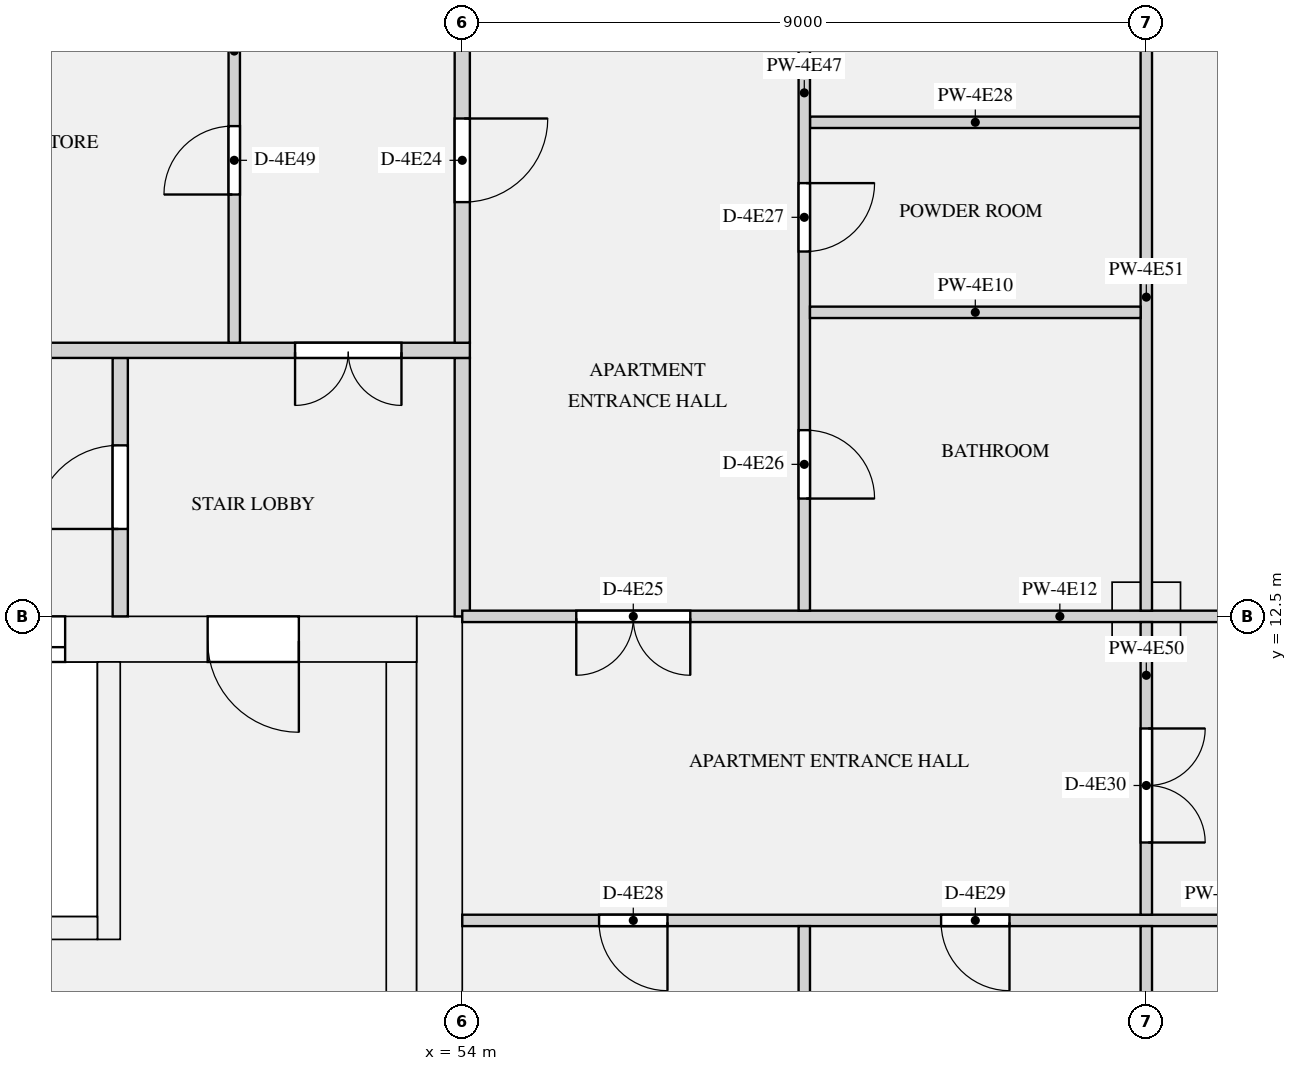
"""IFC4 building model, lengths in metres.
Left out: names, types, materials, properties, quantities, classifications, styles, units other than length and angle.
Written with IfcOpenShell. Run it as: python <this file> out.ifc"""

import sys

from ifc_helpers import new_model, si_unit, direction, frame, frame_2d, origin, origin_2d, place, context, subcontext, project, spatial, rectangle, extrude, element, fill, save


model = new_model("IFC4")
c1 = context("Model", 3, precision=1e-05, world=origin(), true_north=direction((0.0, 1.0)))
c2 = subcontext(c1, "Body", "Model", "MODEL_VIEW")
j1 = project(units=[si_unit("LENGTHUNIT", "METRE"), si_unit("PLANEANGLEUNIT", "RADIAN")], contexts=[c1])
p1 = place(None, origin())
s1 = spatial("IfcSite", under=j1, at=p1, CompositionType="ELEMENT")
p2 = place(p1, origin())
s2 = spatial("IfcBuilding", under=s1, at=p2, CompositionType="ELEMENT")
p3 = place(p2, frame((0.0, 0.0, 232.65)))
s3 = spatial("IfcBuildingStorey", under=s2, at=p3, CompositionType="ELEMENT", Elevation=232.65)
p4 = place(p3, frame((63.0, 12.5, 0.0), z_axis=(0.0, 0.0, 1.0), x_axis=(1.0, 0.0, 0.0)))
e1 = element("IfcColumn", 1, at=p4, inside=s3, PredefinedType="COLUMN", context=c2, shape_type="SweptSolid", body=[
    extrude(rectangle(XDim=0.9, YDim=0.9, at=origin_2d()), origin(), (0.0, 0.0, 1.0), 3.15),
])
p5 = place(p3, frame((53.7, 0.0, 0.0), z_axis=(0.0, 0.0, 1.0), x_axis=(0.0, 1.0, 0.0)))
e2 = element("IfcWall", 2, at=p5, inside=s3, PredefinedType="SHEAR", context=c2, shape_type="SweptSolid", body=[
    extrude(rectangle(XDim=12.5, YDim=0.6, at=frame_2d((6.25, 0.0))), origin(), (0.0, 0.0, 1.0), 3.15),
])
p6 = place(p3, frame((18.6, 12.2, 0.0), z_axis=(0.0, 0.0, 1.0), x_axis=(1.0, 0.0, 0.0)))
e3 = element("IfcWall", 3, at=p6, inside=s3, PredefinedType="SHEAR", context=c2, shape_type="SweptSolid", body=[
    extrude(rectangle(XDim=34.8, YDim=0.6, at=frame_2d((17.4, 0.0))), origin(), (0.0, 0.0, 1.0), 3.15),
])
p7 = place(p6, frame((24.575, 0.0, 0.0)))
e4 = element("IfcOpeningElement", 4, at=p7, cuts=e3, PredefinedType="OPENING", context=c2, shape_type="SweptSolid", body=[
    extrude(rectangle(XDim=1.1, YDim=2.1, at=frame_2d((0.55, 1.05))), frame((0.0, 0.31, 0.0), z_axis=(0.0, -1.0, 0.0), x_axis=(1.0, 0.0, 0.0)), (0.0, 0.0, 1.0), 0.62),
])
p8 = place(p6, frame((26.825, 0.0, 0.0)))
e5 = element("IfcOpeningElement", 5, at=p8, cuts=e3, PredefinedType="OPENING", context=c2, shape_type="SweptSolid", body=[
    extrude(rectangle(XDim=1.1, YDim=2.1, at=frame_2d((0.55, 1.05))), frame((0.0, 0.31, 0.0), z_axis=(0.0, -1.0, 0.0), x_axis=(1.0, 0.0, 0.0)), (0.0, 0.0, 1.0), 0.62),
])
p9 = place(p6, frame((29.075, 0.0, 0.0)))
e6 = element("IfcOpeningElement", 6, at=p9, cuts=e3, PredefinedType="OPENING", context=c2, shape_type="SweptSolid", body=[
    extrude(rectangle(XDim=1.1, YDim=2.1, at=frame_2d((0.55, 1.05))), frame((0.0, 0.31, 0.0), z_axis=(0.0, -1.0, 0.0), x_axis=(1.0, 0.0, 0.0)), (0.0, 0.0, 1.0), 0.62),
])
p10 = place(p6, frame((4.95, 0.0, 0.0)))
e7 = element("IfcOpeningElement", 7, at=p10, cuts=e3, PredefinedType="OPENING", context=c2, shape_type="SweptSolid", body=[
    extrude(rectangle(XDim=0.9, YDim=2.1, at=frame_2d((0.45, 1.05))), frame((0.0, 0.31, 0.0), z_axis=(0.0, -1.0, 0.0), x_axis=(1.0, 0.0, 0.0)), (0.0, 0.0, 1.0), 0.62),
])
p11 = place(p6, frame((11.95, 0.0, 0.0)))
e8 = element("IfcOpeningElement", 8, at=p11, cuts=e3, PredefinedType="OPENING", context=c2, shape_type="SweptSolid", body=[
    extrude(rectangle(XDim=0.9, YDim=2.1, at=frame_2d((0.45, 1.05))), frame((0.0, 0.31, 0.0), z_axis=(0.0, -1.0, 0.0), x_axis=(1.0, 0.0, 0.0)), (0.0, 0.0, 1.0), 0.62),
])
p12 = place(p6, frame((18.45, 0.0, 0.0)))
e9 = element("IfcOpeningElement", 9, at=p12, cuts=e3, PredefinedType="OPENING", context=c2, shape_type="SweptSolid", body=[
    extrude(rectangle(XDim=0.9, YDim=2.1, at=frame_2d((0.45, 1.05))), frame((0.0, 0.31, 0.0), z_axis=(0.0, -1.0, 0.0), x_axis=(1.0, 0.0, 0.0)), (0.0, 0.0, 1.0), 0.62),
])
p13 = place(p6, frame((1.55, 0.0, 0.0)))
e10 = element("IfcOpeningElement", 10, at=p13, cuts=e3, PredefinedType="OPENING", context=c2, shape_type="SweptSolid", body=[
    extrude(rectangle(XDim=1.2, YDim=2.1, at=frame_2d((0.6, 1.05))), frame((0.0, 0.31, 0.0), z_axis=(0.0, -1.0, 0.0), x_axis=(1.0, 0.0, 0.0)), (0.0, 0.0, 1.0), 0.62),
])
p14 = place(p6, frame((32.05, 0.0, 0.0)))
e11 = element("IfcOpeningElement", 11, at=p14, cuts=e3, PredefinedType="OPENING", context=c2, shape_type="SweptSolid", body=[
    extrude(rectangle(XDim=1.2, YDim=2.1, at=frame_2d((0.6, 1.05))), frame((0.0, 0.31, 0.0), z_axis=(0.0, -1.0, 0.0), x_axis=(1.0, 0.0, 0.0)), (0.0, 0.0, 1.0), 0.62),
])
p15 = place(p3, frame((53.2, 1.0, 0.0), z_axis=(0.0, 0.0, 1.0), x_axis=(0.0, 1.0, 0.0)))
e12 = element("IfcWall", 12, at=p15, inside=s3, PredefinedType="SHEAR", context=c2, shape_type="SweptSolid", body=[
    extrude(rectangle(XDim=10.9, YDim=0.4, at=frame_2d((5.45, 0.0))), origin(), (0.0, 0.0, 1.0), 3.15),
])
p16 = place(p3, frame((47.25, 8.4, 0.0), z_axis=(0.0, 0.0, 1.0), x_axis=(1.0, 0.0, 0.0)))
e13 = element("IfcWall", 13, at=p16, inside=s3, PredefinedType="SHEAR", context=c2, shape_type="SweptSolid", body=[
    extrude(rectangle(XDim=1.95, YDim=0.3, at=frame_2d((0.975, 0.0))), origin(), (0.0, 0.0, 1.0), 3.15),
])
p17 = place(p3, frame((49.35, 8.25, 0.0), z_axis=(0.0, 0.0, 1.0), x_axis=(0.0, 1.0, 0.0)))
e14 = element("IfcWall", 14, at=p17, inside=s3, PredefinedType="SHEAR", context=c2, shape_type="SweptSolid", body=[
    extrude(rectangle(XDim=3.65, YDim=0.3, at=frame_2d((1.825, 0.0))), origin(), (0.0, 0.0, 1.0), 3.15),
])
p18 = place(p3, frame((49.5, 12.5, 0.0), z_axis=(0.0, 0.0, 1.0), x_axis=(0.0, 1.0, 0.0)))
e15 = element("IfcWall", 15, at=p18, inside=s3, PredefinedType="PARTITIONING", context=c2, shape_type="SweptSolid", body=[
    extrude(rectangle(XDim=3.4, YDim=0.2, at=frame_2d((1.7, 0.0))), origin(), (0.0, 0.0, 1.0), 2.8),
])
p19 = place(p18, frame((1.15, 0.0, 0.0)))
e16 = element("IfcOpeningElement", 16, at=p19, cuts=e15, PredefinedType="OPENING", context=c2, shape_type="SweptSolid", body=[
    extrude(rectangle(XDim=1.1, YDim=2.1, at=frame_2d((0.55, 1.05))), frame((0.0, 0.11, 0.0), z_axis=(0.0, -1.0, 0.0), x_axis=(1.0, 0.0, 0.0)), (0.0, 0.0, 1.0), 0.22),
])
p20 = place(p3, frame((54.0, 12.5, 0.0), z_axis=(0.0, 0.0, 1.0), x_axis=(0.0, 1.0, 0.0)))
e17 = element("IfcWall", 17, at=p20, inside=s3, PredefinedType="PARTITIONING", context=c2, shape_type="SweptSolid", body=[
    extrude(rectangle(XDim=3.4, YDim=0.2, at=frame_2d((1.7, 0.0))), origin(), (0.0, 0.0, 1.0), 2.8),
])
p21 = place(p3, frame((58.575, 16.5, 0.0), z_axis=(0.0, 0.0, 1.0), x_axis=(1.0, 0.0, 0.0)))
e18 = element("IfcWall", 18, at=p21, inside=s3, PredefinedType="PARTITIONING", context=c2, shape_type="SweptSolid", body=[
    extrude(rectangle(XDim=4.35, YDim=0.15, at=frame_2d((2.175, 0.0))), origin(), (0.0, 0.0, 1.0), 2.8),
])
p22 = place(p3, frame((54.0, 12.5, 0.0), z_axis=(0.0, 0.0, 1.0), x_axis=(1.0, 0.0, 0.0)))
e19 = element("IfcWall", 19, at=p22, inside=s3, PredefinedType="PARTITIONING", context=c2, shape_type="SweptSolid", body=[
    extrude(rectangle(XDim=17.35, YDim=0.15, at=frame_2d((8.675, 0.0))), origin(), (0.0, 0.0, 1.0), 2.8),
])
p23 = place(p22, frame((1.5, 0.0, 0.0)))
e20 = element("IfcOpeningElement", 20, at=p23, cuts=e19, PredefinedType="OPENING", context=c2, shape_type="SweptSolid", body=[
    extrude(rectangle(XDim=1.5, YDim=2.1, at=frame_2d((0.75, 1.05))), frame((0.0, 0.085, 0.0), z_axis=(0.0, -1.0, 0.0), x_axis=(1.0, 0.0, 0.0)), (0.0, 0.0, 1.0), 0.17),
])
p24 = place(p22, frame((12.725, 0.0, 0.0)))
e21 = element("IfcOpeningElement", 21, at=p24, cuts=e19, PredefinedType="OPENING", context=c2, shape_type="SweptSolid", body=[
    extrude(rectangle(XDim=1.5, YDim=2.1, at=frame_2d((0.75, 1.05))), frame((0.0, 0.085, 0.0), z_axis=(0.0, -1.0, 0.0), x_axis=(1.0, 0.0, 0.0)), (0.0, 0.0, 1.0), 0.17),
])
p25 = place(p3, frame((54.0, 8.5, 0.0), z_axis=(0.0, 0.0, 1.0), x_axis=(1.0, 0.0, 0.0)))
e22 = element("IfcWall", 22, at=p25, inside=s3, PredefinedType="PARTITIONING", context=c2, shape_type="SweptSolid", body=[
    extrude(rectangle(XDim=17.35, YDim=0.15, at=frame_2d((8.675, 0.0))), origin(), (0.0, 0.0, 1.0), 2.8),
])
p26 = place(p25, frame((1.8, 0.0, 0.0)))
e23 = element("IfcOpeningElement", 23, at=p26, cuts=e22, PredefinedType="OPENING", context=c2, shape_type="SweptSolid", body=[
    extrude(rectangle(XDim=0.9, YDim=2.1, at=frame_2d((0.45, 1.05))), frame((0.0, 0.085, 0.0), z_axis=(0.0, -1.0, 0.0), x_axis=(1.0, 0.0, 0.0)), (0.0, 0.0, 1.0), 0.17),
])
p27 = place(p25, frame((6.3, 0.0, 0.0)))
e24 = element("IfcOpeningElement", 24, at=p27, cuts=e22, PredefinedType="OPENING", context=c2, shape_type="SweptSolid", body=[
    extrude(rectangle(XDim=0.9, YDim=2.1, at=frame_2d((0.45, 1.05))), frame((0.0, 0.085, 0.0), z_axis=(0.0, -1.0, 0.0), x_axis=(1.0, 0.0, 0.0)), (0.0, 0.0, 1.0), 0.17),
])
p28 = place(p25, frame((12.8, 0.0, 0.0)))
e25 = element("IfcOpeningElement", 25, at=p28, cuts=e22, PredefinedType="OPENING", context=c2, shape_type="SweptSolid", body=[
    extrude(rectangle(XDim=0.9, YDim=2.1, at=frame_2d((0.45, 1.05))), frame((0.0, 0.085, 0.0), z_axis=(0.0, -1.0, 0.0), x_axis=(1.0, 0.0, 0.0)), (0.0, 0.0, 1.0), 0.17),
])
p29 = place(p3, frame((58.575, 19.0, 0.0), z_axis=(0.0, 0.0, 1.0), x_axis=(1.0, 0.0, 0.0)))
e26 = element("IfcWall", 26, at=p29, inside=s3, PredefinedType="PARTITIONING", context=c2, shape_type="SweptSolid", body=[
    extrude(rectangle(XDim=4.35, YDim=0.15, at=frame_2d((2.175, 0.0))), origin(), (0.0, 0.0, 1.0), 2.8),
])
p30 = place(p3, frame((17.9, 16.0, 0.0), z_axis=(0.0, 0.0, 1.0), x_axis=(1.0, 0.0, 0.0)))
e27 = element("IfcWall", 27, at=p30, inside=s3, PredefinedType="PARTITIONING", context=c2, shape_type="SweptSolid", body=[
    extrude(rectangle(XDim=36.2, YDim=0.2, at=frame_2d((18.1, 0.0))), origin(), (0.0, 0.0, 1.0), 2.8),
])
p31 = place(p30, frame((0.9, 0.0, 0.0)))
e28 = element("IfcOpeningElement", 28, at=p31, cuts=e27, PredefinedType="OPENING", context=c2, shape_type="SweptSolid", body=[
    extrude(rectangle(XDim=1.4, YDim=2.1, at=frame_2d((0.7, 1.05))), frame((0.0, 0.11, 0.0), z_axis=(0.0, -1.0, 0.0), x_axis=(1.0, 0.0, 0.0)), (0.0, 0.0, 1.0), 0.22),
])
p32 = place(p30, frame((33.9, 0.0, 0.0)))
e29 = element("IfcOpeningElement", 29, at=p32, cuts=e27, PredefinedType="OPENING", context=c2, shape_type="SweptSolid", body=[
    extrude(rectangle(XDim=1.4, YDim=2.1, at=frame_2d((0.7, 1.05))), frame((0.0, 0.11, 0.0), z_axis=(0.0, -1.0, 0.0), x_axis=(1.0, 0.0, 0.0)), (0.0, 0.0, 1.0), 0.22),
])
p33 = place(p3, frame((54.0, 16.1, 0.0), z_axis=(0.0, 0.0, 1.0), x_axis=(0.0, 1.0, 0.0)))
e30 = element("IfcWall", 30, at=p33, inside=s3, PredefinedType="PARTITIONING", context=c2, shape_type="SweptSolid", body=[
    extrude(rectangle(XDim=7.8, YDim=0.2, at=frame_2d((3.9, 0.0))), origin(), (0.0, 0.0, 1.0), 2.8),
])
p34 = place(p33, frame((1.85, 0.0, 0.0)))
e31 = element("IfcOpeningElement", 31, at=p34, cuts=e30, PredefinedType="OPENING", context=c2, shape_type="SweptSolid", body=[
    extrude(rectangle(XDim=1.1, YDim=2.1, at=frame_2d((0.55, 1.05))), frame((0.0, 0.11, 0.0), z_axis=(0.0, -1.0, 0.0), x_axis=(1.0, 0.0, 0.0)), (0.0, 0.0, 1.0), 0.22),
])
p35 = place(p3, frame((51.0, 16.1, 0.0), z_axis=(0.0, 0.0, 1.0), x_axis=(0.0, 1.0, 0.0)))
e32 = element("IfcWall", 32, at=p35, inside=s3, PredefinedType="PARTITIONING", context=c2, shape_type="SweptSolid", body=[
    extrude(rectangle(XDim=4.825, YDim=0.15, at=frame_2d((2.413, 0.0))), origin(), (0.0, 0.0, 1.0), 2.8),
])
p36 = place(p35, frame((1.95, 0.0, 0.0)))
e33 = element("IfcOpeningElement", 33, at=p36, cuts=e32, PredefinedType="OPENING", context=c2, shape_type="SweptSolid", body=[
    extrude(rectangle(XDim=0.9, YDim=2.1, at=frame_2d((0.45, 1.05))), frame((0.0, 0.085, 0.0), z_axis=(0.0, -1.0, 0.0), x_axis=(1.0, 0.0, 0.0)), (0.0, 0.0, 1.0), 0.17),
])
p37 = place(p3, frame((58.5, 0.65, 0.0), z_axis=(0.0, 0.0, 1.0), x_axis=(0.0, 1.0, 0.0)))
e34 = element("IfcWall", 34, at=p37, inside=s3, PredefinedType="PARTITIONING", context=c2, shape_type="SweptSolid", body=[
    extrude(rectangle(XDim=7.775, YDim=0.15, at=frame_2d((3.888, 0.0))), origin(), (0.0, 0.0, 1.0), 2.8),
])
p38 = place(p3, frame((58.5, 12.575, 0.0), z_axis=(0.0, 0.0, 1.0), x_axis=(0.0, 1.0, 0.0)))
e35 = element("IfcWall", 35, at=p38, inside=s3, PredefinedType="PARTITIONING", context=c2, shape_type="SweptSolid", body=[
    extrude(rectangle(XDim=10.325, YDim=0.15, at=frame_2d((5.163, 0.0))), origin(), (0.0, 0.0, 1.0), 2.8),
])
p39 = place(p38, frame((1.475, 0.0, 0.0)))
e36 = element("IfcOpeningElement", 36, at=p39, cuts=e35, PredefinedType="OPENING", context=c2, shape_type="SweptSolid", body=[
    extrude(rectangle(XDim=0.9, YDim=2.1, at=frame_2d((0.45, 1.05))), frame((0.0, 0.085, 0.0), z_axis=(0.0, -1.0, 0.0), x_axis=(1.0, 0.0, 0.0)), (0.0, 0.0, 1.0), 0.17),
])
p40 = place(p38, frame((4.725, 0.0, 0.0)))
e37 = element("IfcOpeningElement", 37, at=p40, cuts=e35, PredefinedType="OPENING", context=c2, shape_type="SweptSolid", body=[
    extrude(rectangle(XDim=0.9, YDim=2.1, at=frame_2d((0.45, 1.05))), frame((0.0, 0.085, 0.0), z_axis=(0.0, -1.0, 0.0), x_axis=(1.0, 0.0, 0.0)), (0.0, 0.0, 1.0), 0.17),
])
p41 = place(p38, frame((8.0, 0.0, 0.0)))
e38 = element("IfcOpeningElement", 38, at=p41, cuts=e35, PredefinedType="OPENING", context=c2, shape_type="SweptSolid", body=[
    extrude(rectangle(XDim=0.9, YDim=2.1, at=frame_2d((0.45, 1.05))), frame((0.0, 0.085, 0.0), z_axis=(0.0, -1.0, 0.0), x_axis=(1.0, 0.0, 0.0)), (0.0, 0.0, 1.0), 0.17),
])
p42 = place(p3, frame((63.0, 0.65, 0.0), z_axis=(0.0, 0.0, 1.0), x_axis=(0.0, 1.0, 0.0)))
e39 = element("IfcWall", 39, at=p42, inside=s3, PredefinedType="PARTITIONING", context=c2, shape_type="SweptSolid", body=[
    extrude(rectangle(XDim=7.775, YDim=0.15, at=frame_2d((3.888, 0.0))), origin(), (0.0, 0.0, 1.0), 2.8),
])
p43 = place(p3, frame((63.0, 8.575, 0.0), z_axis=(0.0, 0.0, 1.0), x_axis=(0.0, 1.0, 0.0)))
e40 = element("IfcWall", 40, at=p43, inside=s3, PredefinedType="PARTITIONING", context=c2, shape_type="SweptSolid", body=[
    extrude(rectangle(XDim=3.85, YDim=0.15, at=frame_2d((1.925, 0.0))), origin(), (0.0, 0.0, 1.0), 2.8),
])
p44 = place(p43, frame((0.95, 0.0, 0.0)))
e41 = element("IfcOpeningElement", 41, at=p44, cuts=e40, PredefinedType="OPENING", context=c2, shape_type="SweptSolid", body=[
    extrude(rectangle(XDim=1.5, YDim=2.1, at=frame_2d((0.75, 1.05))), frame((0.0, 0.085, 0.0), z_axis=(0.0, -1.0, 0.0), x_axis=(1.0, 0.0, 0.0)), (0.0, 0.0, 1.0), 0.17),
])
p45 = place(p3, frame((63.0, 12.575, 0.0), z_axis=(0.0, 0.0, 1.0), x_axis=(0.0, 1.0, 0.0)))
e42 = element("IfcWall", 42, at=p45, inside=s3, PredefinedType="PARTITIONING", context=c2, shape_type="SweptSolid", body=[
    extrude(rectangle(XDim=11.85, YDim=0.15, at=frame_2d((5.925, 0.0))), origin(), (0.0, 0.0, 1.0), 2.8),
])
p46 = place(p45, frame((8.25, 0.0, 0.0)))
e43 = element("IfcOpeningElement", 43, at=p46, cuts=e42, PredefinedType="OPENING", context=c2, shape_type="SweptSolid", body=[
    extrude(rectangle(XDim=0.9, YDim=2.1, at=frame_2d((0.45, 1.05))), frame((0.0, 0.085, 0.0), z_axis=(0.0, -1.0, 0.0), x_axis=(1.0, 0.0, 0.0)), (0.0, 0.0, 1.0), 0.17),
])
p47 = place(p9, origin())
e44 = element("IfcDoor", 44, at=p47, inside=s3, OperationType="DOUBLE_DOOR_SLIDING", PredefinedType="DOOR", context=c2, shape_type="SweptSolid", body=[
    extrude(rectangle(XDim=1.1, YDim=2.1, at=frame_2d((0.55, 1.05))), frame((0.0, 0.025, 0.0), z_axis=(0.0, -1.0, 0.0), x_axis=(1.0, 0.0, 0.0)), (0.0, 0.0, 1.0), 0.05),
])
fill(e6, e44)
p48 = place(p14, frame((1.2, 0.0, 0.0), z_axis=(0.0, 0.0, 1.0), x_axis=(-1.0, 0.0, 0.0)))
e45 = element("IfcDoor", 45, at=p48, inside=s3, OperationType="SINGLE_SWING_LEFT", PredefinedType="DOOR", context=c2, shape_type="SweptSolid", body=[
    extrude(rectangle(XDim=1.2, YDim=2.1, at=frame_2d((0.6, 1.05))), frame((0.0, 0.025, 0.0), z_axis=(0.0, -1.0, 0.0), x_axis=(1.0, 0.0, 0.0)), (0.0, 0.0, 1.0), 0.05),
])
fill(e11, e45)
p49 = place(p19, origin())
e46 = element("IfcDoor", 46, at=p49, inside=s3, OperationType="SINGLE_SWING_LEFT", PredefinedType="DOOR", context=c2, shape_type="SweptSolid", body=[
    extrude(rectangle(XDim=1.1, YDim=2.1, at=frame_2d((0.55, 1.05))), frame((0.0, 0.025, 0.0), z_axis=(0.0, -1.0, 0.0), x_axis=(1.0, 0.0, 0.0)), (0.0, 0.0, 1.0), 0.05),
])
fill(e16, e46)
p50 = place(p32, frame((1.4, 0.0, 0.0), z_axis=(0.0, 0.0, 1.0), x_axis=(-1.0, 0.0, 0.0)))
e47 = element("IfcDoor", 47, at=p50, inside=s3, OperationType="DOUBLE_DOOR_SINGLE_SWING", PredefinedType="DOOR", context=c2, shape_type="SweptSolid", body=[
    extrude(rectangle(XDim=1.4, YDim=2.1, at=frame_2d((0.7, 1.05))), frame((0.0, 0.025, 0.0), z_axis=(0.0, -1.0, 0.0), x_axis=(1.0, 0.0, 0.0)), (0.0, 0.0, 1.0), 0.05),
])
fill(e29, e47)
p51 = place(p34, frame((1.1, 0.0, 0.0), z_axis=(0.0, 0.0, 1.0), x_axis=(-1.0, 0.0, 0.0)))
e48 = element("IfcDoor", 48, at=p51, inside=s3, OperationType="SINGLE_SWING_LEFT", PredefinedType="DOOR", context=c2, shape_type="SweptSolid", body=[
    extrude(rectangle(XDim=1.1, YDim=2.1, at=frame_2d((0.55, 1.05))), frame((0.0, 0.025, 0.0), z_axis=(0.0, -1.0, 0.0), x_axis=(1.0, 0.0, 0.0)), (0.0, 0.0, 1.0), 0.05),
])
fill(e31, e48)
p52 = place(p23, frame((1.5, 0.0, 0.0), z_axis=(0.0, 0.0, 1.0), x_axis=(-1.0, 0.0, 0.0)))
e49 = element("IfcDoor", 49, at=p52, inside=s3, OperationType="DOUBLE_DOOR_SINGLE_SWING", PredefinedType="DOOR", context=c2, shape_type="SweptSolid", body=[
    extrude(rectangle(XDim=1.5, YDim=2.1, at=frame_2d((0.75, 1.05))), frame((0.0, 0.025, 0.0), z_axis=(0.0, -1.0, 0.0), x_axis=(1.0, 0.0, 0.0)), (0.0, 0.0, 1.0), 0.05),
])
fill(e20, e49)
p53 = place(p39, frame((0.9, 0.0, 0.0), z_axis=(0.0, 0.0, 1.0), x_axis=(-1.0, 0.0, 0.0)))
e50 = element("IfcDoor", 50, at=p53, inside=s3, OperationType="SINGLE_SWING_RIGHT", PredefinedType="DOOR", context=c2, shape_type="SweptSolid", body=[
    extrude(rectangle(XDim=0.9, YDim=2.1, at=frame_2d((0.45, 1.05))), frame((0.0, 0.025, 0.0), z_axis=(0.0, -1.0, 0.0), x_axis=(1.0, 0.0, 0.0)), (0.0, 0.0, 1.0), 0.05),
])
fill(e36, e50)
p54 = place(p40, frame((0.9, 0.0, 0.0), z_axis=(0.0, 0.0, 1.0), x_axis=(-1.0, 0.0, 0.0)))
e51 = element("IfcDoor", 51, at=p54, inside=s3, OperationType="SINGLE_SWING_LEFT", PredefinedType="DOOR", context=c2, shape_type="SweptSolid", body=[
    extrude(rectangle(XDim=0.9, YDim=2.1, at=frame_2d((0.45, 1.05))), frame((0.0, 0.025, 0.0), z_axis=(0.0, -1.0, 0.0), x_axis=(1.0, 0.0, 0.0)), (0.0, 0.0, 1.0), 0.05),
])
fill(e37, e51)
p55 = place(p26, frame((0.9, 0.0, 0.0), z_axis=(0.0, 0.0, 1.0), x_axis=(-1.0, 0.0, 0.0)))
e52 = element("IfcDoor", 52, at=p55, inside=s3, OperationType="SINGLE_SWING_LEFT", PredefinedType="DOOR", context=c2, shape_type="SweptSolid", body=[
    extrude(rectangle(XDim=0.9, YDim=2.1, at=frame_2d((0.45, 1.05))), frame((0.0, 0.025, 0.0), z_axis=(0.0, -1.0, 0.0), x_axis=(1.0, 0.0, 0.0)), (0.0, 0.0, 1.0), 0.05),
])
fill(e23, e52)
p56 = place(p27, frame((0.9, 0.0, 0.0), z_axis=(0.0, 0.0, 1.0), x_axis=(-1.0, 0.0, 0.0)))
e53 = element("IfcDoor", 53, at=p56, inside=s3, OperationType="SINGLE_SWING_LEFT", PredefinedType="DOOR", context=c2, shape_type="SweptSolid", body=[
    extrude(rectangle(XDim=0.9, YDim=2.1, at=frame_2d((0.45, 1.05))), frame((0.0, 0.025, 0.0), z_axis=(0.0, -1.0, 0.0), x_axis=(1.0, 0.0, 0.0)), (0.0, 0.0, 1.0), 0.05),
])
fill(e24, e53)
p57 = place(p44, frame((1.5, 0.0, 0.0), z_axis=(0.0, 0.0, 1.0), x_axis=(-1.0, 0.0, 0.0)))
e54 = element("IfcDoor", 54, at=p57, inside=s3, OperationType="DOUBLE_DOOR_SINGLE_SWING", PredefinedType="DOOR", context=c2, shape_type="SweptSolid", body=[
    extrude(rectangle(XDim=1.5, YDim=2.1, at=frame_2d((0.75, 1.05))), frame((0.0, 0.025, 0.0), z_axis=(0.0, -1.0, 0.0), x_axis=(1.0, 0.0, 0.0)), (0.0, 0.0, 1.0), 0.05),
])
fill(e41, e54)
p58 = place(p36, origin())
e55 = element("IfcDoor", 55, at=p58, inside=s3, OperationType="SINGLE_SWING_LEFT", PredefinedType="DOOR", context=c2, shape_type="SweptSolid", body=[
    extrude(rectangle(XDim=0.9, YDim=2.1, at=frame_2d((0.45, 1.05))), frame((0.0, 0.025, 0.0), z_axis=(0.0, -1.0, 0.0), x_axis=(1.0, 0.0, 0.0)), (0.0, 0.0, 1.0), 0.05),
])
fill(e33, e55)
save(model, sys.argv[1])
